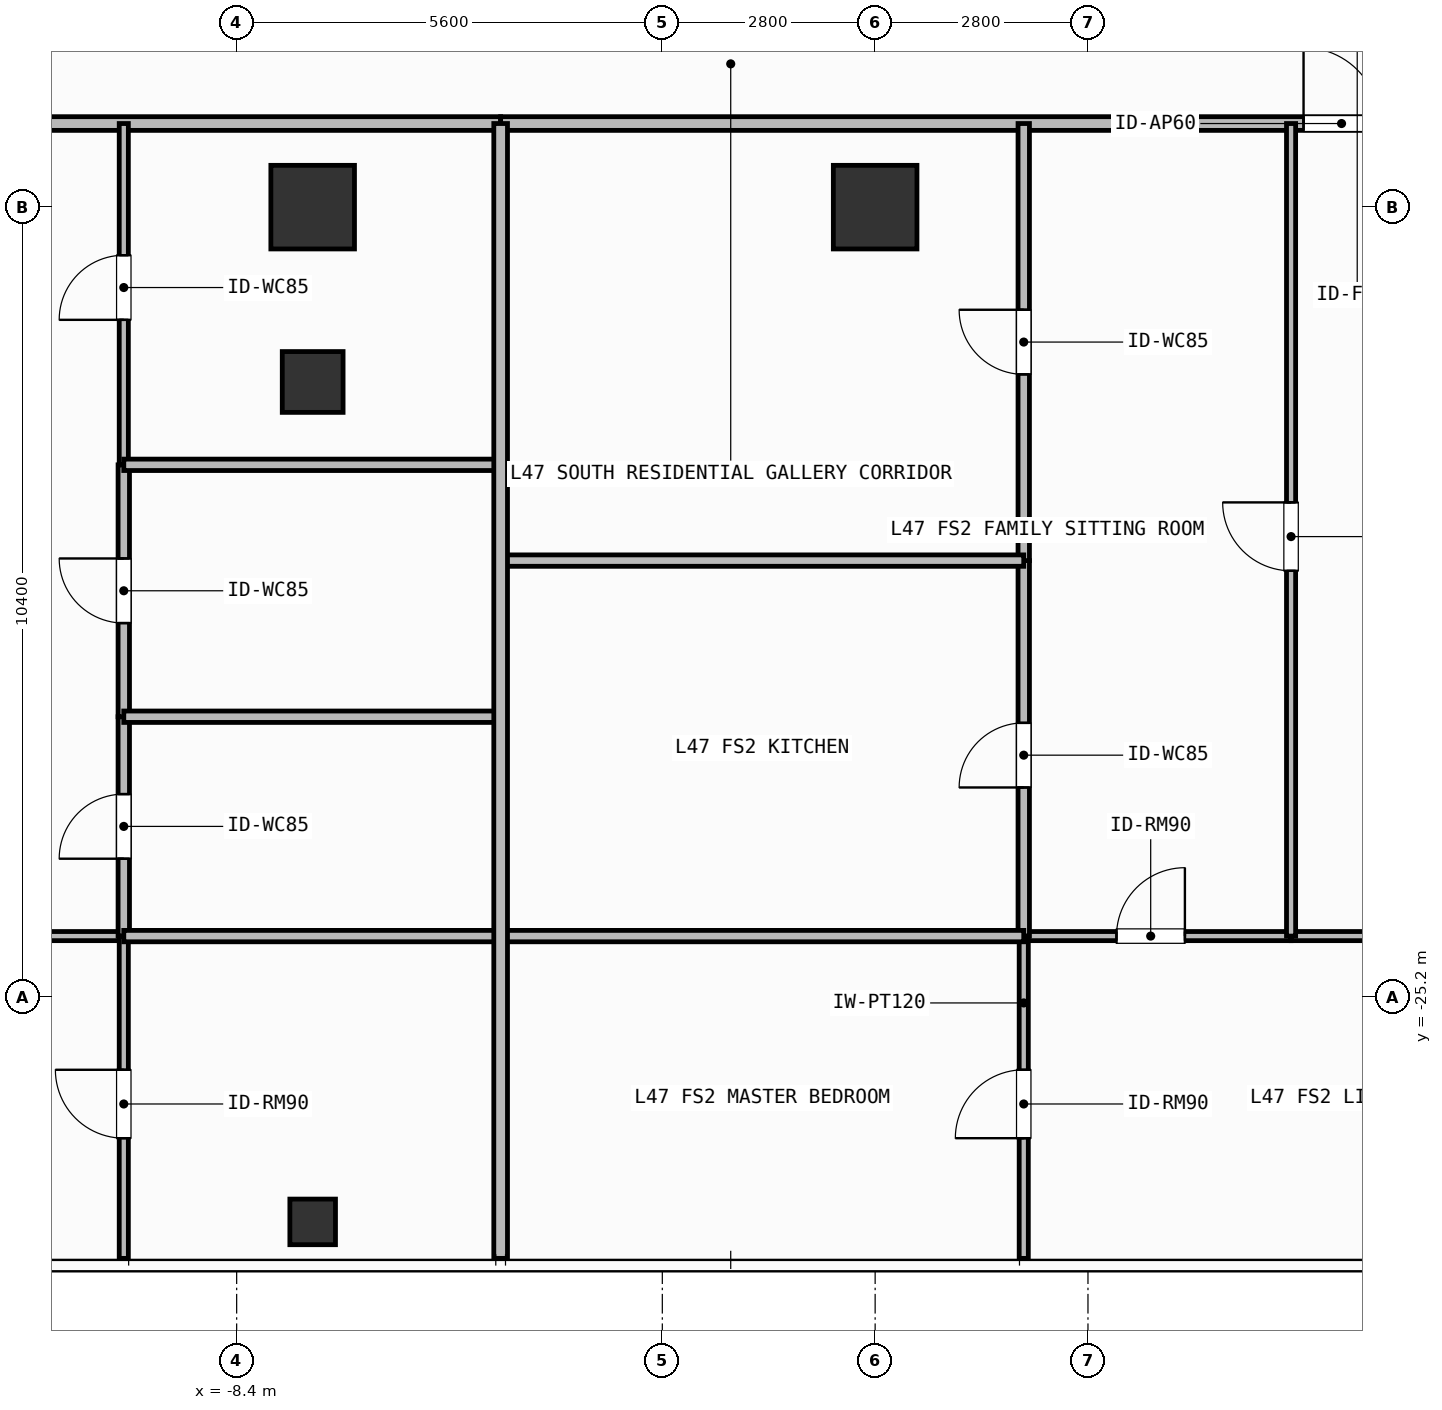
"""IFC4 building model, lengths in metres.
Left out: names, types, materials, properties, quantities, classifications, styles, units other than length and angle.
Written with IfcOpenShell. Run it as: python <this file> out.ifc"""

import sys

from ifc_helpers import new_model, si_unit, direction, frame, frame_2d, origin, origin_2d, place, context, subcontext, project, spatial, rectangle, hollow_rectangle, extrude, element, fill, save


model = new_model("IFC4")
c1 = context("Model", 3, precision=1e-05, world=origin(), true_north=direction((0.0, 1.0)))
c2 = subcontext(c1, "Body", "Model", "MODEL_VIEW")
j1 = project(units=[si_unit("LENGTHUNIT", "METRE"), si_unit("PLANEANGLEUNIT", "RADIAN")], contexts=[c1])
p1 = place(None, origin())
s1 = spatial("IfcSite", under=j1, at=p1, CompositionType="ELEMENT")
p2 = place(p1, origin())
s2 = spatial("IfcBuilding", under=s1, at=p2, CompositionType="ELEMENT")
p3 = place(p2, frame((0.0, 0.0, 191.4)))
s3 = spatial("IfcBuildingStorey", under=s2, at=p3, CompositionType="ELEMENT", Elevation=191.4)
for number, where, z_axis, x_axis in (
    (1, (-7.4, -14.8, 0.0), (0.0, 0.0, 1.0), (1.0, 0.0, 0.0)),
    (2, (0.0, -14.8, 0.0), (0.0, 0.0, 1.0), (1.0, 0.0, 0.0)),
):
    element("IfcColumn", number, at=place(p3, frame(where, z_axis=z_axis, x_axis=x_axis)), inside=s3, PredefinedType="COLUMN", context=c2, shape_type="SweptSolid", body=[
        extrude(rectangle(XDim=1.1, YDim=1.1, at=origin_2d()), origin(), (0.0, 0.0, 1.0), 3.9),
    ])
p4 = place(p3, frame((-7.4, -17.1, 0.0), z_axis=(0.0, 0.0, 1.0), x_axis=(1.0, 0.0, 0.0)))
e3 = element("IfcColumn", 3, at=p4, inside=s3, PredefinedType="COLUMN", context=c2, shape_type="SweptSolid", body=[
    extrude(hollow_rectangle(XDim=0.8, YDim=0.8, WallThickness=0.036, at=origin_2d()), origin(), (0.0, 0.0, 1.0), 3.9),
])
p5 = place(p3, frame((-7.4, -28.15, 0.0), z_axis=(0.0, 0.0, 1.0), x_axis=(1.0, 0.0, 0.0)))
e4 = element("IfcColumn", 4, at=p5, inside=s3, PredefinedType="COLUMN", context=c2, shape_type="SweptSolid", body=[
    extrude(hollow_rectangle(XDim=0.6, YDim=0.6, WallThickness=0.028, at=origin_2d()), origin(), (0.0, 0.0, 1.0), 3.9),
])
p6 = place(p3, frame((-20.82, -13.7, 0.0), z_axis=(0.0, 0.0, 1.0), x_axis=(1.0, 0.0, 0.0)))
e5 = element("IfcWall", 5, at=p6, inside=s3, PredefinedType="PARTITIONING", context=c2, shape_type="SweptSolid", body=[
    extrude(rectangle(XDim=15.893, YDim=0.18, at=frame_2d((7.947, 0.0))), origin(), (0.0, 0.0, 1.0), 3.68),
])
p7 = place(p6, frame((6.997, 0.0, 0.0)))
e6 = element("IfcOpeningElement", 6, at=p7, cuts=e5, PredefinedType="OPENING", context=c2, shape_type="SweptSolid", body=[
    extrude(rectangle(XDim=1.0, YDim=2.2, at=frame_2d((0.5, 1.1))), frame((0.0, 0.1, 0.0), z_axis=(0.0, -1.0, 0.0), x_axis=(1.0, 0.0, 0.0)), (0.0, 0.0, 1.0), 0.2),
])
p8 = place(p3, frame((-16.774, -24.39, 0.0), z_axis=(0.0, 0.0, 1.0), x_axis=(1.0, 0.0, 0.0)))
e7 = element("IfcWall", 7, at=p8, inside=s3, PredefinedType="PARTITIONING", context=c2, shape_type="SweptSolid", body=[
    extrude(rectangle(XDim=6.889, YDim=0.12, at=frame_2d((3.444, 0.0))), origin(), (0.0, 0.0, 1.0), 3.68),
])
p9 = place(p8, frame((2.994, 0.0, 0.0)))
e8 = element("IfcOpeningElement", 8, at=p9, cuts=e7, PredefinedType="OPENING", context=c2, shape_type="SweptSolid", body=[
    extrude(rectangle(XDim=0.9, YDim=2.1, at=frame_2d((0.45, 1.05))), frame((0.0, 0.07, 0.0), z_axis=(0.0, -1.0, 0.0), x_axis=(1.0, 0.0, 0.0)), (0.0, 0.0, 1.0), 0.14),
])
p10 = place(p3, frame((-9.885, -24.39, 0.0), z_axis=(0.0, 0.0, 1.0), x_axis=(0.0, 1.0, 0.0)))
e9 = element("IfcWall", 9, at=p10, inside=s3, PredefinedType="PARTITIONING", context=c2, shape_type="SweptSolid", body=[
    extrude(rectangle(XDim=2.886, YDim=0.15, at=frame_2d((1.443, 0.0))), origin(), (0.0, 0.0, 1.0), 3.68),
])
p11 = place(p10, frame((1.018, 0.0, 0.0)))
e10 = element("IfcOpeningElement", 10, at=p11, cuts=e9, PredefinedType="OPENING", context=c2, shape_type="SweptSolid", body=[
    extrude(rectangle(XDim=0.85, YDim=2.1, at=frame_2d((0.425, 1.05))), frame((0.0, 0.085, 0.0), z_axis=(0.0, -1.0, 0.0), x_axis=(1.0, 0.0, 0.0)), (0.0, 0.0, 1.0), 0.17),
])
p12 = place(p3, frame((-9.885, -21.504, 0.0), z_axis=(0.0, 0.0, 1.0), x_axis=(0.0, 1.0, 0.0)))
e11 = element("IfcWall", 11, at=p12, inside=s3, PredefinedType="PARTITIONING", context=c2, shape_type="SweptSolid", body=[
    extrude(rectangle(XDim=3.314, YDim=0.15, at=frame_2d((1.657, 0.0))), origin(), (0.0, 0.0, 1.0), 3.68),
])
p13 = place(p12, frame((1.232, 0.0, 0.0)))
e12 = element("IfcOpeningElement", 12, at=p13, cuts=e11, PredefinedType="OPENING", context=c2, shape_type="SweptSolid", body=[
    extrude(rectangle(XDim=0.85, YDim=2.1, at=frame_2d((0.425, 1.05))), frame((0.0, 0.085, 0.0), z_axis=(0.0, -1.0, 0.0), x_axis=(1.0, 0.0, 0.0)), (0.0, 0.0, 1.0), 0.17),
])
p14 = place(p3, frame((-9.885, -18.19, 0.0), z_axis=(0.0, 0.0, 1.0), x_axis=(0.0, 1.0, 0.0)))
e13 = element("IfcWall", 13, at=p14, inside=s3, PredefinedType="PARTITIONING", context=c2, shape_type="SweptSolid", body=[
    extrude(rectangle(XDim=4.49, YDim=0.12, at=frame_2d((2.245, 0.0))), origin(), (0.0, 0.0, 1.0), 3.68),
])
p15 = place(p14, frame((1.907, 0.0, 0.0)))
e14 = element("IfcOpeningElement", 14, at=p15, cuts=e13, PredefinedType="OPENING", context=c2, shape_type="SweptSolid", body=[
    extrude(rectangle(XDim=0.85, YDim=2.1, at=frame_2d((0.425, 1.05))), frame((0.0, 0.07, 0.0), z_axis=(0.0, -1.0, 0.0), x_axis=(1.0, 0.0, 0.0)), (0.0, 0.0, 1.0), 0.14),
])
p16 = place(p3, frame((-9.885, -28.63, 0.0), z_axis=(0.0, 0.0, 1.0), x_axis=(0.0, 1.0, 0.0)))
e15 = element("IfcWall", 15, at=p16, inside=s3, PredefinedType="PARTITIONING", context=c2, shape_type="SweptSolid", body=[
    extrude(rectangle(XDim=4.24, YDim=0.12, at=frame_2d((2.12, 0.0))), origin(), (0.0, 0.0, 1.0), 3.68),
])
p17 = place(p16, frame((1.581, 0.0, 0.0)))
e16 = element("IfcOpeningElement", 16, at=p17, cuts=e15, PredefinedType="OPENING", context=c2, shape_type="SweptSolid", body=[
    extrude(rectangle(XDim=0.9, YDim=2.1, at=frame_2d((0.45, 1.05))), frame((0.0, 0.07, 0.0), z_axis=(0.0, -1.0, 0.0), x_axis=(1.0, 0.0, 0.0)), (0.0, 0.0, 1.0), 0.14),
])
p18 = place(p3, frame((-4.927, -13.7, 0.0), z_axis=(0.0, 0.0, 1.0), x_axis=(1.0, 0.0, 0.0)))
e17 = element("IfcWall", 17, at=p18, inside=s3, PredefinedType="PARTITIONING", context=c2, shape_type="SweptSolid", body=[
    extrude(rectangle(XDim=21.947, YDim=0.18, at=frame_2d((10.974, 0.0))), origin(), (0.0, 0.0, 1.0), 3.68),
])
p19 = place(p18, frame((10.563, 0.0, 0.0)))
e18 = element("IfcOpeningElement", 18, at=p19, cuts=e17, PredefinedType="OPENING", context=c2, shape_type="SweptSolid", body=[
    extrude(rectangle(XDim=1.0, YDim=2.2, at=frame_2d((0.5, 1.1))), frame((0.0, 0.1, 0.0), z_axis=(0.0, -1.0, 0.0), x_axis=(1.0, 0.0, 0.0)), (0.0, 0.0, 1.0), 0.2),
])
p20 = place(p3, frame((1.955, -24.39, 0.0), z_axis=(0.0, 0.0, 1.0), x_axis=(1.0, 0.0, 0.0)))
e19 = element("IfcWall", 19, at=p20, inside=s3, PredefinedType="PARTITIONING", context=c2, shape_type="SweptSolid", body=[
    extrude(rectangle(XDim=3.517, YDim=0.12, at=frame_2d((1.758, 0.0))), origin(), (0.0, 0.0, 1.0), 3.68),
])
p21 = place(p20, frame((1.22, 0.0, 0.0)))
e20 = element("IfcOpeningElement", 20, at=p21, cuts=e19, PredefinedType="OPENING", context=c2, shape_type="SweptSolid", body=[
    extrude(rectangle(XDim=0.9, YDim=2.1, at=frame_2d((0.45, 1.05))), frame((0.0, 0.07, 0.0), z_axis=(0.0, -1.0, 0.0), x_axis=(1.0, 0.0, 0.0)), (0.0, 0.0, 1.0), 0.14),
])
p22 = place(p3, frame((5.472, -24.39, 0.0), z_axis=(0.0, 0.0, 1.0), x_axis=(1.0, 0.0, 0.0)))
e21 = element("IfcWall", 21, at=p22, inside=s3, PredefinedType="PARTITIONING", context=c2, shape_type="SweptSolid", body=[
    extrude(rectangle(XDim=5.342, YDim=0.12, at=frame_2d((2.671, 0.0))), origin(), (0.0, 0.0, 1.0), 3.68),
])
p23 = place(p22, frame((2.131, 0.0, 0.0)))
e22 = element("IfcOpeningElement", 22, at=p23, cuts=e21, PredefinedType="OPENING", context=c2, shape_type="SweptSolid", body=[
    extrude(rectangle(XDim=0.9, YDim=2.1, at=frame_2d((0.45, 1.05))), frame((0.0, 0.07, 0.0), z_axis=(0.0, -1.0, 0.0), x_axis=(1.0, 0.0, 0.0)), (0.0, 0.0, 1.0), 0.14),
])
p24 = place(p3, frame((5.472, -24.39, 0.0), z_axis=(0.0, 0.0, 1.0), x_axis=(0.0, 1.0, 0.0)))
e23 = element("IfcWall", 23, at=p24, inside=s3, PredefinedType="PARTITIONING", context=c2, shape_type="SweptSolid", body=[
    extrude(rectangle(XDim=10.69, YDim=0.12, at=frame_2d((5.345, 0.0))), origin(), (0.0, 0.0, 1.0), 3.68),
])
p25 = place(p24, frame((4.806, 0.0, 0.0)))
e24 = element("IfcOpeningElement", 24, at=p25, cuts=e23, PredefinedType="OPENING", context=c2, shape_type="SweptSolid", body=[
    extrude(rectangle(XDim=0.9, YDim=2.1, at=frame_2d((0.45, 1.05))), frame((0.0, 0.07, 0.0), z_axis=(0.0, -1.0, 0.0), x_axis=(1.0, 0.0, 0.0)), (0.0, 0.0, 1.0), 0.14),
])
p26 = place(p3, frame((1.955, -24.39, 0.0), z_axis=(0.0, 0.0, 1.0), x_axis=(0.0, 1.0, 0.0)))
e25 = element("IfcWall", 25, at=p26, inside=s3, PredefinedType="PARTITIONING", context=c2, shape_type="SweptSolid", body=[
    extrude(rectangle(XDim=4.94, YDim=0.15, at=frame_2d((2.47, 0.0))), origin(), (0.0, 0.0, 1.0), 3.68),
])
p27 = place(p26, frame((1.955, 0.0, 0.0)))
e26 = element("IfcOpeningElement", 26, at=p27, cuts=e25, PredefinedType="OPENING", context=c2, shape_type="SweptSolid", body=[
    extrude(rectangle(XDim=0.85, YDim=2.1, at=frame_2d((0.425, 1.05))), frame((0.0, 0.085, 0.0), z_axis=(0.0, -1.0, 0.0), x_axis=(1.0, 0.0, 0.0)), (0.0, 0.0, 1.0), 0.17),
])
p28 = place(p3, frame((1.955, -19.45, 0.0), z_axis=(0.0, 0.0, 1.0), x_axis=(0.0, 1.0, 0.0)))
e27 = element("IfcWall", 27, at=p28, inside=s3, PredefinedType="PARTITIONING", context=c2, shape_type="SweptSolid", body=[
    extrude(rectangle(XDim=5.75, YDim=0.15, at=frame_2d((2.875, 0.0))), origin(), (0.0, 0.0, 1.0), 3.68),
])
p29 = place(p28, frame((2.45, 0.0, 0.0)))
e28 = element("IfcOpeningElement", 28, at=p29, cuts=e27, PredefinedType="OPENING", context=c2, shape_type="SweptSolid", body=[
    extrude(rectangle(XDim=0.85, YDim=2.1, at=frame_2d((0.425, 1.05))), frame((0.0, 0.085, 0.0), z_axis=(0.0, -1.0, 0.0), x_axis=(1.0, 0.0, 0.0)), (0.0, 0.0, 1.0), 0.17),
])
p30 = place(p3, frame((1.955, -28.63, 0.0), z_axis=(0.0, 0.0, 1.0), x_axis=(0.0, 1.0, 0.0)))
e29 = element("IfcWall", 29, at=p30, inside=s3, PredefinedType="PARTITIONING", context=c2, shape_type="SweptSolid", body=[
    extrude(rectangle(XDim=4.24, YDim=0.12, at=frame_2d((2.12, 0.0))), origin(), (0.0, 0.0, 1.0), 3.68),
])
p31 = place(p30, frame((1.581, 0.0, 0.0)))
e30 = element("IfcOpeningElement", 30, at=p31, cuts=e29, PredefinedType="OPENING", context=c2, shape_type="SweptSolid", body=[
    extrude(rectangle(XDim=0.9, YDim=2.1, at=frame_2d((0.45, 1.05))), frame((0.0, 0.07, 0.0), z_axis=(0.0, -1.0, 0.0), x_axis=(1.0, 0.0, 0.0)), (0.0, 0.0, 1.0), 0.14),
])
for number, where, z_axis, x_axis in (
    (31, (-9.885, -21.504, 0.0), (0.0, 0.0, 1.0), (1.0, 0.0, 0.0)),
    (32, (-9.885, -18.19, 0.0), (0.0, 0.0, 1.0), (1.0, 0.0, 0.0)),
    (33, (-9.885, -24.39, 0.0), (0.0, 0.0, 1.0), (1.0, 0.0, 0.0)),
):
    element("IfcWall", number, at=place(p3, frame(where, z_axis=z_axis, x_axis=x_axis)), inside=s3, PredefinedType="PARTITIONING", context=c2, shape_type="SweptSolid", body=[
        extrude(rectangle(XDim=4.958, YDim=0.15, at=frame_2d((2.479, 0.0))), origin(), (0.0, 0.0, 1.0), 3.68),
    ])
for number, where, z_axis, x_axis in (
    (34, (-4.927, -19.45, 0.0), (0.0, 0.0, 1.0), (1.0, 0.0, 0.0)),
    (35, (-4.927, -24.39, 0.0), (0.0, 0.0, 1.0), (1.0, 0.0, 0.0)),
):
    element("IfcWall", number, at=place(p3, frame(where, z_axis=z_axis, x_axis=x_axis)), inside=s3, PredefinedType="PARTITIONING", context=c2, shape_type="SweptSolid", body=[
        extrude(rectangle(XDim=6.882, YDim=0.15, at=frame_2d((3.441, 0.0))), origin(), (0.0, 0.0, 1.0), 3.68),
    ])
p32 = place(p3, frame((-4.927, -28.63, 0.0), z_axis=(0.0, 0.0, 1.0), x_axis=(0.0, 1.0, 0.0)))
e36 = element("IfcWall", 36, at=p32, inside=s3, PredefinedType="PARTITIONING", context=c2, shape_type="SweptSolid", body=[
    extrude(rectangle(XDim=14.93, YDim=0.18, at=frame_2d((7.465, 0.0))), origin(), (0.0, 0.0, 1.0), 3.68),
])
p33 = place(p11, origin())
e37 = element("IfcDoor", 37, at=p33, inside=s3, OperationType="SINGLE_SWING_LEFT", PredefinedType="DOOR", context=c2, shape_type="SweptSolid", body=[
    extrude(rectangle(XDim=0.85, YDim=2.1, at=frame_2d((0.425, 1.05))), frame((0.0, 0.025, 0.0), z_axis=(0.0, -1.0, 0.0), x_axis=(1.0, 0.0, 0.0)), (0.0, 0.0, 1.0), 0.05),
])
fill(e10, e37)
p34 = place(p13, origin())
e38 = element("IfcDoor", 38, at=p34, inside=s3, OperationType="SINGLE_SWING_RIGHT", PredefinedType="DOOR", context=c2, shape_type="SweptSolid", body=[
    extrude(rectangle(XDim=0.85, YDim=2.1, at=frame_2d((0.425, 1.05))), frame((0.0, 0.025, 0.0), z_axis=(0.0, -1.0, 0.0), x_axis=(1.0, 0.0, 0.0)), (0.0, 0.0, 1.0), 0.05),
])
fill(e12, e38)
p35 = place(p15, origin())
e39 = element("IfcDoor", 39, at=p35, inside=s3, OperationType="SINGLE_SWING_LEFT", PredefinedType="DOOR", context=c2, shape_type="SweptSolid", body=[
    extrude(rectangle(XDim=0.85, YDim=2.1, at=frame_2d((0.425, 1.05))), frame((0.0, 0.025, 0.0), z_axis=(0.0, -1.0, 0.0), x_axis=(1.0, 0.0, 0.0)), (0.0, 0.0, 1.0), 0.05),
])
fill(e14, e39)
p36 = place(p17, origin())
e40 = element("IfcDoor", 40, at=p36, inside=s3, OperationType="SINGLE_SWING_RIGHT", PredefinedType="DOOR", context=c2, shape_type="SweptSolid", body=[
    extrude(rectangle(XDim=0.9, YDim=2.1, at=frame_2d((0.45, 1.05))), frame((0.0, 0.025, 0.0), z_axis=(0.0, -1.0, 0.0), x_axis=(1.0, 0.0, 0.0)), (0.0, 0.0, 1.0), 0.05),
])
fill(e16, e40)
p37 = place(p19, origin())
e41 = element("IfcDoor", 41, at=p37, inside=s3, OperationType="SINGLE_SWING_LEFT", PredefinedType="DOOR", context=c2, shape_type="SweptSolid", body=[
    extrude(rectangle(XDim=1.0, YDim=2.2, at=frame_2d((0.5, 1.1))), frame((0.0, 0.025, 0.0), z_axis=(0.0, -1.0, 0.0), x_axis=(1.0, 0.0, 0.0)), (0.0, 0.0, 1.0), 0.05),
])
fill(e18, e41)
p38 = place(p21, origin())
e42 = element("IfcDoor", 42, at=p38, inside=s3, OperationType="SINGLE_SWING_RIGHT", PredefinedType="DOOR", context=c2, shape_type="SweptSolid", body=[
    extrude(rectangle(XDim=0.9, YDim=2.1, at=frame_2d((0.45, 1.05))), frame((0.0, 0.025, 0.0), z_axis=(0.0, -1.0, 0.0), x_axis=(1.0, 0.0, 0.0)), (0.0, 0.0, 1.0), 0.05),
])
fill(e20, e42)
p39 = place(p25, origin())
e43 = element("IfcDoor", 43, at=p39, inside=s3, OperationType="SINGLE_SWING_RIGHT", PredefinedType="DOOR", context=c2, shape_type="SweptSolid", body=[
    extrude(rectangle(XDim=0.9, YDim=2.1, at=frame_2d((0.45, 1.05))), frame((0.0, 0.025, 0.0), z_axis=(0.0, -1.0, 0.0), x_axis=(1.0, 0.0, 0.0)), (0.0, 0.0, 1.0), 0.05),
])
fill(e24, e43)
p40 = place(p27, origin())
e44 = element("IfcDoor", 44, at=p40, inside=s3, OperationType="SINGLE_SWING_LEFT", PredefinedType="DOOR", context=c2, shape_type="SweptSolid", body=[
    extrude(rectangle(XDim=0.85, YDim=2.1, at=frame_2d((0.425, 1.05))), frame((0.0, 0.025, 0.0), z_axis=(0.0, -1.0, 0.0), x_axis=(1.0, 0.0, 0.0)), (0.0, 0.0, 1.0), 0.05),
])
fill(e26, e44)
p41 = place(p29, origin())
e45 = element("IfcDoor", 45, at=p41, inside=s3, OperationType="SINGLE_SWING_RIGHT", PredefinedType="DOOR", context=c2, shape_type="SweptSolid", body=[
    extrude(rectangle(XDim=0.85, YDim=2.1, at=frame_2d((0.425, 1.05))), frame((0.0, 0.025, 0.0), z_axis=(0.0, -1.0, 0.0), x_axis=(1.0, 0.0, 0.0)), (0.0, 0.0, 1.0), 0.05),
])
fill(e28, e45)
p42 = place(p31, origin())
e46 = element("IfcDoor", 46, at=p42, inside=s3, OperationType="SINGLE_SWING_LEFT", PredefinedType="DOOR", context=c2, shape_type="SweptSolid", body=[
    extrude(rectangle(XDim=0.9, YDim=2.1, at=frame_2d((0.45, 1.05))), frame((0.0, 0.025, 0.0), z_axis=(0.0, -1.0, 0.0), x_axis=(1.0, 0.0, 0.0)), (0.0, 0.0, 1.0), 0.05),
])
fill(e30, e46)
save(model, sys.argv[1])
